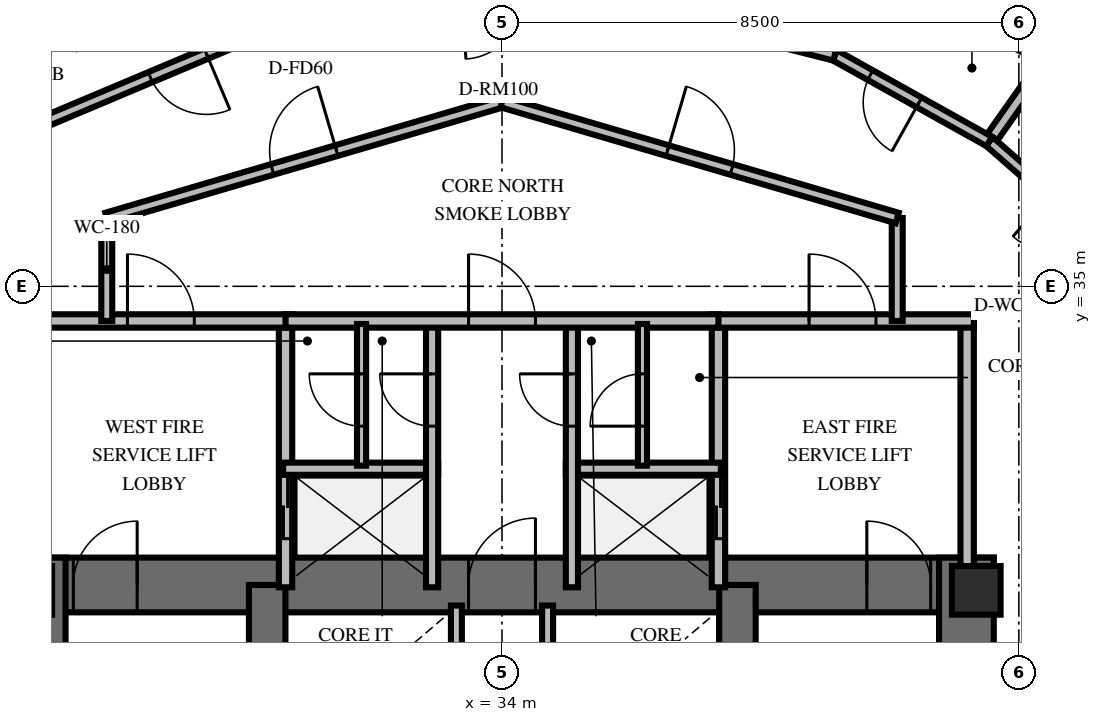
"""IFC4 building model, lengths in metres.
Left out: names, types, materials, properties, quantities, classifications, styles, units other than length and angle.
Written with IfcOpenShell. Run it as: python <this file> out.ifc"""

import sys

from ifc_helpers import new_model, si_unit, direction, frame, frame_2d, origin, origin_2d, place, context, subcontext, project, spatial, rectangle, extrude, element, fill, save


model = new_model("IFC4")
c1 = context("Model", 3, precision=1e-05, world=origin(), true_north=direction((0.0, 1.0)))
c2 = subcontext(c1, "Body", "Model", "MODEL_VIEW")
j1 = project(units=[si_unit("LENGTHUNIT", "METRE"), si_unit("PLANEANGLEUNIT", "RADIAN")], contexts=[c1])
p1 = place(None, origin())
s1 = spatial("IfcSite", under=j1, at=p1, CompositionType="ELEMENT")
p2 = place(p1, origin())
s2 = spatial("IfcBuilding", under=s1, at=p2, CompositionType="ELEMENT")
p3 = place(p2, frame((0.0, 0.0, 42.6)))
s3 = spatial("IfcBuildingStorey", under=s2, at=p3, CompositionType="ELEMENT", Elevation=42.6)
p4 = place(p3, frame((25.922, 30.088, 0.0), z_axis=(0.0, 0.0, 1.0), x_axis=(1.0, 0.0, 0.0)))
e1 = element("IfcWall", 1, at=p4, inside=s3, PredefinedType="SHEAR", context=c2, shape_type="SweptSolid", body=[
    extrude(rectangle(XDim=16.166, YDim=0.9, at=frame_2d((8.083, 0.0))), origin(), (0.0, 0.0, 1.0), 4.2),
])
p5 = place(p4, frame((1.028, 0.0, 0.0)))
e2 = element("IfcOpeningElement", 2, at=p5, cuts=e1, PredefinedType="OPENING", context=c2, shape_type="SweptSolid", body=[
    extrude(rectangle(XDim=1.05, YDim=2.15, at=frame_2d((0.525, 1.075))), frame((0.0, 0.46, 0.0), z_axis=(0.0, -1.0, 0.0), x_axis=(1.0, 0.0, 0.0)), (0.0, 0.0, 1.0), 0.92),
])
p6 = place(p4, frame((14.078, 0.0, 0.0)))
e3 = element("IfcOpeningElement", 3, at=p6, cuts=e1, PredefinedType="OPENING", context=c2, shape_type="SweptSolid", body=[
    extrude(rectangle(XDim=1.05, YDim=2.15, at=frame_2d((0.525, 1.075))), frame((0.0, 0.46, 0.0), z_axis=(0.0, -1.0, 0.0), x_axis=(1.0, 0.0, 0.0)), (0.0, 0.0, 1.0), 0.92),
])
p7 = place(p4, frame((7.528, 0.0, 0.0)))
e4 = element("IfcOpeningElement", 4, at=p7, cuts=e1, PredefinedType="OPENING", context=c2, shape_type="SweptSolid", body=[
    extrude(rectangle(XDim=1.1, YDim=2.15, at=frame_2d((0.55, 1.075))), frame((0.0, 0.46, 0.0), z_axis=(0.0, -1.0, 0.0), x_axis=(1.0, 0.0, 0.0)), (0.0, 0.0, 1.0), 0.92),
])
for number, where, z_axis, x_axis in (
    (5, (26.372, 19.662, 0.0), (0.0, 0.0, 1.0), (0.0, 1.0, 0.0)),
    (6, (41.638, 19.662, 0.0), (0.0, 0.0, 1.0), (0.0, 1.0, 0.0)),
):
    element("IfcWall", number, at=place(p3, frame(where, z_axis=z_axis, x_axis=x_axis)), inside=s3, PredefinedType="SHEAR", context=c2, shape_type="SweptSolid", body=[
        extrude(rectangle(XDim=10.876, YDim=0.9, at=frame_2d((5.438, 0.0))), origin(), (0.0, 0.0, 1.0), 4.2),
    ])
for number, where, z_axis, x_axis in (
    (7, (30.138, 20.112, 0.0), (0.0, 0.0, 1.0), (0.0, 1.0, 0.0)),
    (8, (37.872, 20.112, 0.0), (0.0, 0.0, 1.0), (0.0, 1.0, 0.0)),
):
    element("IfcWall", number, at=place(p3, frame(where, z_axis=z_axis, x_axis=x_axis)), inside=s3, PredefinedType="SHEAR", context=c2, shape_type="SweptSolid", body=[
        extrude(rectangle(XDim=9.976, YDim=0.6, at=frame_2d((4.988, 0.0))), origin(), (0.0, 0.0, 1.0), 4.2),
    ])
p8 = place(p3, frame((41.8, 30.0, 0.0), z_axis=(0.0, 0.0, 1.0), x_axis=(1.0, 0.0, 0.0)))
e9 = element("IfcColumn", 9, at=p8, inside=s3, PredefinedType="PILASTER", context=c2, shape_type="SweptSolid", body=[
    extrude(rectangle(XDim=0.8, YDim=0.8, at=origin_2d()), origin(), (0.0, 0.0, 1.0), 4.2),
])
p9 = place(p3, frame((30.44, 30.05, 0.0), z_axis=(0.0, 0.0, 1.0), x_axis=(0.0, 1.0, 0.0)))
e10 = element("IfcWall", 10, at=p9, inside=s3, PredefinedType="SOLIDWALL", context=c2, shape_type="SweptSolid", body=[
    extrude(rectangle(XDim=4.38, YDim=0.22, at=frame_2d((2.19, 0.0))), origin(), (0.0, 0.0, 1.0), 3.0),
])
p10 = place(p9, frame((0.8, 0.0, 0.0)))
e11 = element("IfcOpeningElement", 11, at=p10, cuts=e10, PredefinedType="OPENING", context=c2, shape_type="SweptSolid", body=[
    extrude(rectangle(XDim=1.05, YDim=2.1, at=frame_2d((0.525, 1.05))), frame((0.0, 0.12, 0.0), z_axis=(0.0, -1.0, 0.0), x_axis=(1.0, 0.0, 0.0)), (0.0, 0.0, 1.0), 0.24),
])
p11 = place(p3, frame((26.24, 34.43, 0.0), z_axis=(0.0, 0.0, 1.0), x_axis=(1.0, 0.0, 0.0)))
e12 = element("IfcWall", 12, at=p11, inside=s3, PredefinedType="SOLIDWALL", context=c2, shape_type="SweptSolid", body=[
    extrude(rectangle(XDim=4.31, YDim=0.22, at=frame_2d((2.155, 0.0))), origin(), (0.0, 0.0, 1.0), 3.0),
])
p12 = place(p11, frame((1.6, 0.0, 0.0)))
e13 = element("IfcOpeningElement", 13, at=p12, cuts=e12, PredefinedType="OPENING", context=c2, shape_type="SweptSolid", body=[
    extrude(rectangle(XDim=1.1, YDim=2.15, at=frame_2d((0.55, 1.075))), frame((0.0, 0.12, 0.0), z_axis=(0.0, -1.0, 0.0), x_axis=(1.0, 0.0, 0.0)), (0.0, 0.0, 1.0), 0.24),
])
p13 = place(p3, frame((30.4, 32.0, 0.0), z_axis=(0.0, 0.0, 1.0), x_axis=(1.0, 0.0, 0.0)))
e14 = element("IfcWall", 14, at=p13, inside=s3, PredefinedType="SOLIDWALL", context=c2, shape_type="SweptSolid", body=[
    extrude(rectangle(XDim=2.55, YDim=0.2, at=frame_2d((1.275, 0.0))), origin(), (0.0, 0.0, 1.0), 3.0),
])
p14 = place(p3, frame((32.85, 30.05, 0.0), z_axis=(0.0, 0.0, 1.0), x_axis=(0.0, 1.0, 0.0)))
e15 = element("IfcWall", 15, at=p14, inside=s3, PredefinedType="SOLIDWALL", context=c2, shape_type="SweptSolid", body=[
    extrude(rectangle(XDim=4.38, YDim=0.2, at=frame_2d((2.19, 0.0))), origin(), (0.0, 0.0, 1.0), 3.0),
])
p15 = place(p14, frame((2.65, 0.0, 0.0)))
e16 = element("IfcOpeningElement", 16, at=p15, cuts=e15, PredefinedType="OPENING", context=c2, shape_type="SweptSolid", body=[
    extrude(rectangle(XDim=0.86, YDim=2.05, at=frame_2d((0.43, 1.025))), frame((0.0, 0.11, 0.0), z_axis=(0.0, -1.0, 0.0), x_axis=(1.0, 0.0, 0.0)), (0.0, 0.0, 1.0), 0.22),
])
p16 = place(p3, frame((37.56, 30.05, 0.0), z_axis=(0.0, 0.0, 1.0), x_axis=(0.0, 1.0, 0.0)))
e17 = element("IfcWall", 17, at=p16, inside=s3, PredefinedType="SOLIDWALL", context=c2, shape_type="SweptSolid", body=[
    extrude(rectangle(XDim=4.38, YDim=0.22, at=frame_2d((2.19, 0.0))), origin(), (0.0, 0.0, 1.0), 3.0),
])
p17 = place(p16, frame((0.8, 0.0, 0.0)))
e18 = element("IfcOpeningElement", 18, at=p17, cuts=e17, PredefinedType="OPENING", context=c2, shape_type="SweptSolid", body=[
    extrude(rectangle(XDim=1.05, YDim=2.1, at=frame_2d((0.525, 1.05))), frame((0.0, 0.12, 0.0), z_axis=(0.0, -1.0, 0.0), x_axis=(1.0, 0.0, 0.0)), (0.0, 0.0, 1.0), 0.24),
])
p18 = place(p3, frame((41.65, 30.05, 0.0), z_axis=(0.0, 0.0, 1.0), x_axis=(0.0, 1.0, 0.0)))
e19 = element("IfcWall", 19, at=p18, inside=s3, PredefinedType="SOLIDWALL", context=c2, shape_type="SweptSolid", body=[
    extrude(rectangle(XDim=4.38, YDim=0.22, at=frame_2d((2.19, 0.0))), origin(), (0.0, 0.0, 1.0), 3.0),
])
p19 = place(p3, frame((37.45, 34.43, 0.0), z_axis=(0.0, 0.0, 1.0), x_axis=(1.0, 0.0, 0.0)))
e20 = element("IfcWall", 20, at=p19, inside=s3, PredefinedType="SOLIDWALL", context=c2, shape_type="SweptSolid", body=[
    extrude(rectangle(XDim=4.31, YDim=0.22, at=frame_2d((2.155, 0.0))), origin(), (0.0, 0.0, 1.0), 3.0),
])
p20 = place(p19, frame((1.6, 0.0, 0.0)))
e21 = element("IfcOpeningElement", 21, at=p20, cuts=e20, PredefinedType="OPENING", context=c2, shape_type="SweptSolid", body=[
    extrude(rectangle(XDim=1.1, YDim=2.15, at=frame_2d((0.55, 1.075))), frame((0.0, 0.12, 0.0), z_axis=(0.0, -1.0, 0.0), x_axis=(1.0, 0.0, 0.0)), (0.0, 0.0, 1.0), 0.24),
])
p21 = place(p3, frame((35.05, 32.0, 0.0), z_axis=(0.0, 0.0, 1.0), x_axis=(1.0, 0.0, 0.0)))
e22 = element("IfcWall", 22, at=p21, inside=s3, PredefinedType="SOLIDWALL", context=c2, shape_type="SweptSolid", body=[
    extrude(rectangle(XDim=2.55, YDim=0.2, at=frame_2d((1.275, 0.0))), origin(), (0.0, 0.0, 1.0), 3.0),
])
p22 = place(p3, frame((35.15, 30.05, 0.0), z_axis=(0.0, 0.0, 1.0), x_axis=(0.0, 1.0, 0.0)))
e23 = element("IfcWall", 23, at=p22, inside=s3, PredefinedType="SOLIDWALL", context=c2, shape_type="SweptSolid", body=[
    extrude(rectangle(XDim=4.38, YDim=0.2, at=frame_2d((2.19, 0.0))), origin(), (0.0, 0.0, 1.0), 3.0),
])
p23 = place(p22, frame((2.65, 0.0, 0.0)))
e24 = element("IfcOpeningElement", 24, at=p23, cuts=e23, PredefinedType="OPENING", context=c2, shape_type="SweptSolid", body=[
    extrude(rectangle(XDim=0.86, YDim=2.05, at=frame_2d((0.43, 1.025))), frame((0.0, 0.11, 0.0), z_axis=(0.0, -1.0, 0.0), x_axis=(1.0, 0.0, 0.0)), (0.0, 0.0, 1.0), 0.22),
])
p24 = place(p3, frame((30.44, 34.43, 0.0), z_axis=(0.0, 0.0, 1.0), x_axis=(1.0, 0.0, 0.0)))
e25 = element("IfcWall", 25, at=p24, inside=s3, PredefinedType="SOLIDWALL", context=c2, shape_type="SweptSolid", body=[
    extrude(rectangle(XDim=7.12, YDim=0.22, at=frame_2d((3.56, 0.0))), origin(), (0.0, 0.0, 1.0), 3.0),
])
p25 = place(p24, frame((3.01, 0.0, 0.0)))
e26 = element("IfcOpeningElement", 26, at=p25, cuts=e25, PredefinedType="OPENING", context=c2, shape_type="SweptSolid", body=[
    extrude(rectangle(XDim=1.1, YDim=2.15, at=frame_2d((0.55, 1.075))), frame((0.0, 0.12, 0.0), z_axis=(0.0, -1.0, 0.0), x_axis=(1.0, 0.0, 0.0)), (0.0, 0.0, 1.0), 0.24),
])
p26 = place(p3, frame((31.69, 32.05, 0.0), z_axis=(0.0, 0.0, 1.0), x_axis=(0.0, 1.0, 0.0)))
e27 = element("IfcWall", 27, at=p26, inside=s3, PredefinedType="PARTITIONING", context=c2, shape_type="SweptSolid", body=[
    extrude(rectangle(XDim=2.33, YDim=0.15, at=frame_2d((1.165, 0.0))), origin(), (0.0, 0.0, 1.0), 3.0),
])
p27 = place(p26, frame((0.65, 0.0, 0.0)))
e28 = element("IfcOpeningElement", 28, at=p27, cuts=e27, PredefinedType="OPENING", context=c2, shape_type="SweptSolid", body=[
    extrude(rectangle(XDim=0.86, YDim=2.05, at=frame_2d((0.43, 1.025))), frame((0.0, 0.085, 0.0), z_axis=(0.0, -1.0, 0.0), x_axis=(1.0, 0.0, 0.0)), (0.0, 0.0, 1.0), 0.17),
])
p28 = place(p3, frame((36.31, 32.05, 0.0), z_axis=(0.0, 0.0, 1.0), x_axis=(0.0, 1.0, 0.0)))
e29 = element("IfcWall", 29, at=p28, inside=s3, PredefinedType="PARTITIONING", context=c2, shape_type="SweptSolid", body=[
    extrude(rectangle(XDim=2.33, YDim=0.15, at=frame_2d((1.165, 0.0))), origin(), (0.0, 0.0, 1.0), 3.0),
])
p29 = place(p28, frame((0.65, 0.0, 0.0)))
e30 = element("IfcOpeningElement", 30, at=p29, cuts=e29, PredefinedType="OPENING", context=c2, shape_type="SweptSolid", body=[
    extrude(rectangle(XDim=0.86, YDim=2.05, at=frame_2d((0.43, 1.025))), frame((0.0, 0.085, 0.0), z_axis=(0.0, -1.0, 0.0), x_axis=(1.0, 0.0, 0.0)), (0.0, 0.0, 1.0), 0.17),
])
for number, where, z_axis, x_axis in (
    (31, (33.25, 27.28, 0.0), (0.0, 0.0, 1.0), (0.0, 1.0, 0.0)),
    (32, (34.75, 27.28, 0.0), (0.0, 0.0, 1.0), (0.0, 1.0, 0.0)),
):
    element("IfcWall", number, at=place(p3, frame(where, z_axis=z_axis, x_axis=x_axis)), inside=s3, PredefinedType="SOLIDWALL", context=c2, shape_type="SweptSolid", body=[
        extrude(rectangle(XDim=2.47, YDim=0.18, at=frame_2d((1.235, 0.0))), origin(), (0.0, 0.0, 1.0), 3.0),
    ])
for number, where, z_axis, x_axis in (
    (33, (27.5, 34.43, 0.0), (0.0, 0.0, 1.0), (0.0, 1.0, 0.0)),
    (34, (40.5, 36.123, 0.0), (0.0, 0.0, 1.0), (0.0, -1.0, 0.0)),
):
    element("IfcWall", number, at=place(p3, frame(where, z_axis=z_axis, x_axis=x_axis)), inside=s3, PredefinedType="PARTITIONING", context=c2, shape_type="SweptSolid", body=[
        extrude(rectangle(XDim=1.693, YDim=0.18, at=frame_2d((0.846, 0.0))), origin(), (0.0, 0.0, 1.0), 3.0),
    ])
p30 = place(p3, frame((27.5, 36.123, 0.0), z_axis=(0.0, 0.0, 1.0), x_axis=(0.959546654541, 0.281549671923, 0.0)))
e35 = element("IfcWall", 35, at=p30, inside=s3, PredefinedType="PARTITIONING", context=c2, shape_type="SweptSolid", body=[
    extrude(rectangle(XDim=6.774, YDim=0.18, at=frame_2d((3.387, 0.0))), origin(), (0.0, 0.0, 1.0), 3.0),
])
p31 = place(p30, frame((2.837, 0.0, 0.0)))
e36 = element("IfcOpeningElement", 36, at=p31, cuts=e35, PredefinedType="OPENING", context=c2, shape_type="SweptSolid", body=[
    extrude(rectangle(XDim=1.1, YDim=2.15, at=frame_2d((0.55, 1.075))), frame((0.0, 0.1, 0.0), z_axis=(0.0, -1.0, 0.0), x_axis=(1.0, 0.0, 0.0)), (0.0, 0.0, 1.0), 0.2),
])
p32 = place(p3, frame((34.0, 38.03, 0.0), z_axis=(0.0, 0.0, 1.0), x_axis=(0.959546654541, -0.281549671923, 0.0)))
e37 = element("IfcWall", 37, at=p32, inside=s3, PredefinedType="PARTITIONING", context=c2, shape_type="SweptSolid", body=[
    extrude(rectangle(XDim=6.774, YDim=0.18, at=frame_2d((3.387, 0.0))), origin(), (0.0, 0.0, 1.0), 3.0),
])
p33 = place(p32, frame((2.837, 0.0, 0.0)))
e38 = element("IfcOpeningElement", 38, at=p33, cuts=e37, PredefinedType="OPENING", context=c2, shape_type="SweptSolid", body=[
    extrude(rectangle(XDim=1.1, YDim=2.15, at=frame_2d((0.55, 1.075))), frame((0.0, 0.1, 0.0), z_axis=(0.0, -1.0, 0.0), x_axis=(1.0, 0.0, 0.0)), (0.0, 0.0, 1.0), 0.2),
])
p34 = place(p3, frame((42.014, 37.382, 0.0), z_axis=(0.0, 0.0, 1.0), x_axis=(0.575724287065, 0.817643898823, 0.0)))
e39 = element("IfcWall", 39, at=p34, inside=s3, PredefinedType="PLUMBINGWALL", context=c2, shape_type="SweptSolid", body=[
    extrude(rectangle(XDim=1.65, YDim=0.2, at=frame_2d((0.825, 0.0))), origin(), (0.0, 0.0, 1.0), 3.0),
])
p35 = place(p3, frame((44.205, 35.467, 0.0), z_axis=(0.0, 0.0, 1.0), x_axis=(-0.753033847665, 0.657981781109, 0.0)))
e40 = element("IfcWall", 40, at=p35, inside=s3, PredefinedType="PARTITIONING", context=c2, shape_type="SweptSolid", body=[
    extrude(rectangle(XDim=2.91, YDim=0.18, at=frame_2d((1.455, 0.0))), origin(), (0.0, 0.0, 1.0), 3.0),
])
p36 = place(p35, frame((0.669, 0.0, 0.0)))
e41 = element("IfcOpeningElement", 41, at=p36, cuts=e40, PredefinedType="OPENING", context=c2, shape_type="SweptSolid", body=[
    extrude(rectangle(XDim=0.92, YDim=2.1, at=frame_2d((0.46, 1.05))), frame((0.0, 0.1, 0.0), z_axis=(0.0, -1.0, 0.0), x_axis=(1.0, 0.0, 0.0)), (0.0, 0.0, 1.0), 0.2),
])
p37 = place(p3, frame((39.472, 38.799, 0.0), z_axis=(0.0, 0.0, 1.0), x_axis=(0.393097774941, 0.919496677176, 0.0)))
e42 = element("IfcWall", 42, at=p37, inside=s3, PredefinedType="PLUMBINGWALL", context=c2, shape_type="SweptSolid", body=[
    extrude(rectangle(XDim=1.65, YDim=0.2, at=frame_2d((0.825, 0.0))), origin(), (0.0, 0.0, 1.0), 3.0),
])
p38 = place(p3, frame((42.964, 38.731, 0.0), z_axis=(0.0, 0.0, 1.0), x_axis=(-0.873324603811, 0.487138723957, 0.0)))
e43 = element("IfcWall", 43, at=p38, inside=s3, PredefinedType="PLUMBINGWALL", context=c2, shape_type="SweptSolid", body=[
    extrude(rectangle(XDim=3.255, YDim=0.2, at=frame_2d((1.627, 0.0))), origin(), (0.0, 0.0, 1.0), 3.0),
])
p39 = place(p3, frame((42.014, 37.382, 0.0), z_axis=(0.0, 0.0, 1.0), x_axis=(-0.873348775144, 0.487095387943, 0.0)))
e44 = element("IfcWall", 44, at=p39, inside=s3, PredefinedType="PARTITIONING", context=c2, shape_type="SweptSolid", body=[
    extrude(rectangle(XDim=2.91, YDim=0.18, at=frame_2d((1.455, 0.0))), origin(), (0.0, 0.0, 1.0), 3.0),
])
p40 = place(p39, frame((1.321, 0.0, 0.0)))
e45 = element("IfcOpeningElement", 45, at=p40, cuts=e44, PredefinedType="OPENING", context=c2, shape_type="SweptSolid", body=[
    extrude(rectangle(XDim=0.92, YDim=2.1, at=frame_2d((0.46, 1.05))), frame((0.0, 0.1, 0.0), z_axis=(0.0, -1.0, 0.0), x_axis=(1.0, 0.0, 0.0)), (0.0, 0.0, 1.0), 0.2),
])
p41 = place(p3, frame((39.472, 38.799, 0.0), z_axis=(0.0, 0.0, 1.0), x_axis=(-0.969655815334, 0.244474129079, 0.0)))
e46 = element("IfcWall", 46, at=p41, inside=s3, PredefinedType="PARTITIONING", context=c2, shape_type="SweptSolid", body=[
    extrude(rectangle(XDim=4.355, YDim=0.18, at=frame_2d((2.177, 0.0))), origin(), (0.0, 0.0, 1.0), 3.0),
])
p42 = place(p3, frame((30.904, 39.571, 0.0), z_axis=(0.0, 0.0, 1.0), x_axis=(-0.921533629475, -0.388298557488, 0.0)))
e47 = element("IfcWall", 47, at=p42, inside=s3, PredefinedType="PARTITIONING", context=c2, shape_type="SweptSolid", body=[
    extrude(rectangle(XDim=4.834, YDim=0.18, at=frame_2d((2.417, 0.0))), origin(), (0.0, 0.0, 1.0), 3.0),
])
p43 = place(p42, frame((1.917, 0.0, 0.0)))
e48 = element("IfcOpeningElement", 48, at=p43, cuts=e47, PredefinedType="OPENING", context=c2, shape_type="SweptSolid", body=[
    extrude(rectangle(XDim=1.0, YDim=2.15, at=frame_2d((0.5, 1.075))), frame((0.0, 0.1, 0.0), z_axis=(0.0, -1.0, 0.0), x_axis=(1.0, 0.0, 0.0)), (0.0, 0.0, 1.0), 0.2),
])
p44 = place(p5, origin())
e49 = element("IfcDoor", 49, at=p44, inside=s3, OperationType="SINGLE_SWING_RIGHT", PredefinedType="DOOR", context=c2, shape_type="SweptSolid", body=[
    extrude(rectangle(XDim=1.05, YDim=2.15, at=frame_2d((0.525, 1.075))), frame((0.0, 0.025, 0.0), z_axis=(0.0, -1.0, 0.0), x_axis=(1.0, 0.0, 0.0)), (0.0, 0.0, 1.0), 0.05),
])
fill(e2, e49)
p45 = place(p6, origin())
e50 = element("IfcDoor", 50, at=p45, inside=s3, OperationType="SINGLE_SWING_LEFT", PredefinedType="DOOR", context=c2, shape_type="SweptSolid", body=[
    extrude(rectangle(XDim=1.05, YDim=2.15, at=frame_2d((0.525, 1.075))), frame((0.0, 0.025, 0.0), z_axis=(0.0, -1.0, 0.0), x_axis=(1.0, 0.0, 0.0)), (0.0, 0.0, 1.0), 0.05),
])
fill(e3, e50)
p46 = place(p7, origin())
e51 = element("IfcDoor", 51, at=p46, inside=s3, OperationType="SINGLE_SWING_RIGHT", PredefinedType="DOOR", context=c2, shape_type="SweptSolid", body=[
    extrude(rectangle(XDim=1.1, YDim=2.15, at=frame_2d((0.55, 1.075))), frame((0.0, 0.025, 0.0), z_axis=(0.0, -1.0, 0.0), x_axis=(1.0, 0.0, 0.0)), (0.0, 0.0, 1.0), 0.05),
])
fill(e4, e51)
p47 = place(p12, origin())
e52 = element("IfcDoor", 52, at=p47, inside=s3, OperationType="SINGLE_SWING_LEFT", PredefinedType="DOOR", context=c2, shape_type="SweptSolid", body=[
    extrude(rectangle(XDim=1.1, YDim=2.15, at=frame_2d((0.55, 1.075))), frame((0.0, 0.025, 0.0), z_axis=(0.0, -1.0, 0.0), x_axis=(1.0, 0.0, 0.0)), (0.0, 0.0, 1.0), 0.05),
])
fill(e13, e52)
p48 = place(p10, origin())
e53 = element("IfcDoor", 53, at=p48, inside=s3, OperationType="DOUBLE_DOOR_SLIDING", PredefinedType="USERDEFINED", context=c2, shape_type="SweptSolid", body=[
    extrude(rectangle(XDim=1.05, YDim=2.1, at=frame_2d((0.525, 1.05))), frame((0.0, 0.025, 0.0), z_axis=(0.0, -1.0, 0.0), x_axis=(1.0, 0.0, 0.0)), (0.0, 0.0, 1.0), 0.05),
])
fill(e11, e53)
p49 = place(p15, origin())
e54 = element("IfcDoor", 54, at=p49, inside=s3, OperationType="SINGLE_SWING_RIGHT", PredefinedType="TRAPDOOR", context=c2, shape_type="SweptSolid", body=[
    extrude(rectangle(XDim=0.86, YDim=2.05, at=frame_2d((0.43, 1.025))), frame((0.0, 0.025, 0.0), z_axis=(0.0, -1.0, 0.0), x_axis=(1.0, 0.0, 0.0)), (0.0, 0.0, 1.0), 0.05),
])
fill(e16, e54)
p50 = place(p20, origin())
e55 = element("IfcDoor", 55, at=p50, inside=s3, OperationType="SINGLE_SWING_LEFT", PredefinedType="DOOR", context=c2, shape_type="SweptSolid", body=[
    extrude(rectangle(XDim=1.1, YDim=2.15, at=frame_2d((0.55, 1.075))), frame((0.0, 0.025, 0.0), z_axis=(0.0, -1.0, 0.0), x_axis=(1.0, 0.0, 0.0)), (0.0, 0.0, 1.0), 0.05),
])
fill(e21, e55)
p51 = place(p17, origin())
e56 = element("IfcDoor", 56, at=p51, inside=s3, OperationType="DOUBLE_DOOR_SLIDING", PredefinedType="USERDEFINED", context=c2, shape_type="SweptSolid", body=[
    extrude(rectangle(XDim=1.05, YDim=2.1, at=frame_2d((0.525, 1.05))), frame((0.0, 0.025, 0.0), z_axis=(0.0, -1.0, 0.0), x_axis=(1.0, 0.0, 0.0)), (0.0, 0.0, 1.0), 0.05),
])
fill(e18, e56)
p52 = place(p23, origin())
e57 = element("IfcDoor", 57, at=p52, inside=s3, OperationType="SINGLE_SWING_RIGHT", PredefinedType="TRAPDOOR", context=c2, shape_type="SweptSolid", body=[
    extrude(rectangle(XDim=0.86, YDim=2.05, at=frame_2d((0.43, 1.025))), frame((0.0, 0.025, 0.0), z_axis=(0.0, -1.0, 0.0), x_axis=(1.0, 0.0, 0.0)), (0.0, 0.0, 1.0), 0.05),
])
fill(e24, e57)
p53 = place(p25, origin())
e58 = element("IfcDoor", 58, at=p53, inside=s3, OperationType="SINGLE_SWING_LEFT", PredefinedType="DOOR", context=c2, shape_type="SweptSolid", body=[
    extrude(rectangle(XDim=1.1, YDim=2.15, at=frame_2d((0.55, 1.075))), frame((0.0, 0.025, 0.0), z_axis=(0.0, -1.0, 0.0), x_axis=(1.0, 0.0, 0.0)), (0.0, 0.0, 1.0), 0.05),
])
fill(e26, e58)
p54 = place(p27, origin())
e59 = element("IfcDoor", 59, at=p54, inside=s3, OperationType="SINGLE_SWING_RIGHT", PredefinedType="TRAPDOOR", context=c2, shape_type="SweptSolid", body=[
    extrude(rectangle(XDim=0.86, YDim=2.05, at=frame_2d((0.43, 1.025))), frame((0.0, 0.025, 0.0), z_axis=(0.0, -1.0, 0.0), x_axis=(1.0, 0.0, 0.0)), (0.0, 0.0, 1.0), 0.05),
])
fill(e28, e59)
p55 = place(p29, origin())
e60 = element("IfcDoor", 60, at=p55, inside=s3, OperationType="SINGLE_SWING_LEFT", PredefinedType="TRAPDOOR", context=c2, shape_type="SweptSolid", body=[
    extrude(rectangle(XDim=0.86, YDim=2.05, at=frame_2d((0.43, 1.025))), frame((0.0, 0.025, 0.0), z_axis=(0.0, -1.0, 0.0), x_axis=(1.0, 0.0, 0.0)), (0.0, 0.0, 1.0), 0.05),
])
fill(e30, e60)
p56 = place(p31, origin())
e61 = element("IfcDoor", 61, at=p56, inside=s3, OperationType="SINGLE_SWING_RIGHT", PredefinedType="DOOR", context=c2, shape_type="SweptSolid", body=[
    extrude(rectangle(XDim=1.1, YDim=2.15, at=frame_2d((0.55, 1.075))), frame((0.0, 0.025, 0.0), z_axis=(0.0, -1.0, 0.0), x_axis=(1.0, 0.0, 0.0)), (0.0, 0.0, 1.0), 0.05),
])
fill(e36, e61)
p57 = place(p33, origin())
e62 = element("IfcDoor", 62, at=p57, inside=s3, OperationType="SINGLE_SWING_LEFT", PredefinedType="DOOR", context=c2, shape_type="SweptSolid", body=[
    extrude(rectangle(XDim=1.1, YDim=2.15, at=frame_2d((0.55, 1.075))), frame((0.0, 0.025, 0.0), z_axis=(0.0, -1.0, 0.0), x_axis=(1.0, 0.0, 0.0)), (0.0, 0.0, 1.0), 0.05),
])
fill(e38, e62)
p58 = place(p40, origin())
e63 = element("IfcDoor", 63, at=p58, inside=s3, OperationType="SINGLE_SWING_LEFT", PredefinedType="DOOR", context=c2, shape_type="SweptSolid", body=[
    extrude(rectangle(XDim=0.92, YDim=2.1, at=frame_2d((0.46, 1.05))), frame((0.0, 0.025, 0.0), z_axis=(0.0, -1.0, 0.0), x_axis=(1.0, 0.0, 0.0)), (0.0, 0.0, 1.0), 0.05),
])
fill(e45, e63)
p59 = place(p43, origin())
e64 = element("IfcDoor", 64, at=p59, inside=s3, OperationType="SINGLE_SWING_LEFT", PredefinedType="DOOR", context=c2, shape_type="SweptSolid", body=[
    extrude(rectangle(XDim=1.0, YDim=2.15, at=frame_2d((0.5, 1.075))), frame((0.0, 0.025, 0.0), z_axis=(0.0, -1.0, 0.0), x_axis=(1.0, 0.0, 0.0)), (0.0, 0.0, 1.0), 0.05),
])
fill(e48, e64)
save(model, sys.argv[1])
